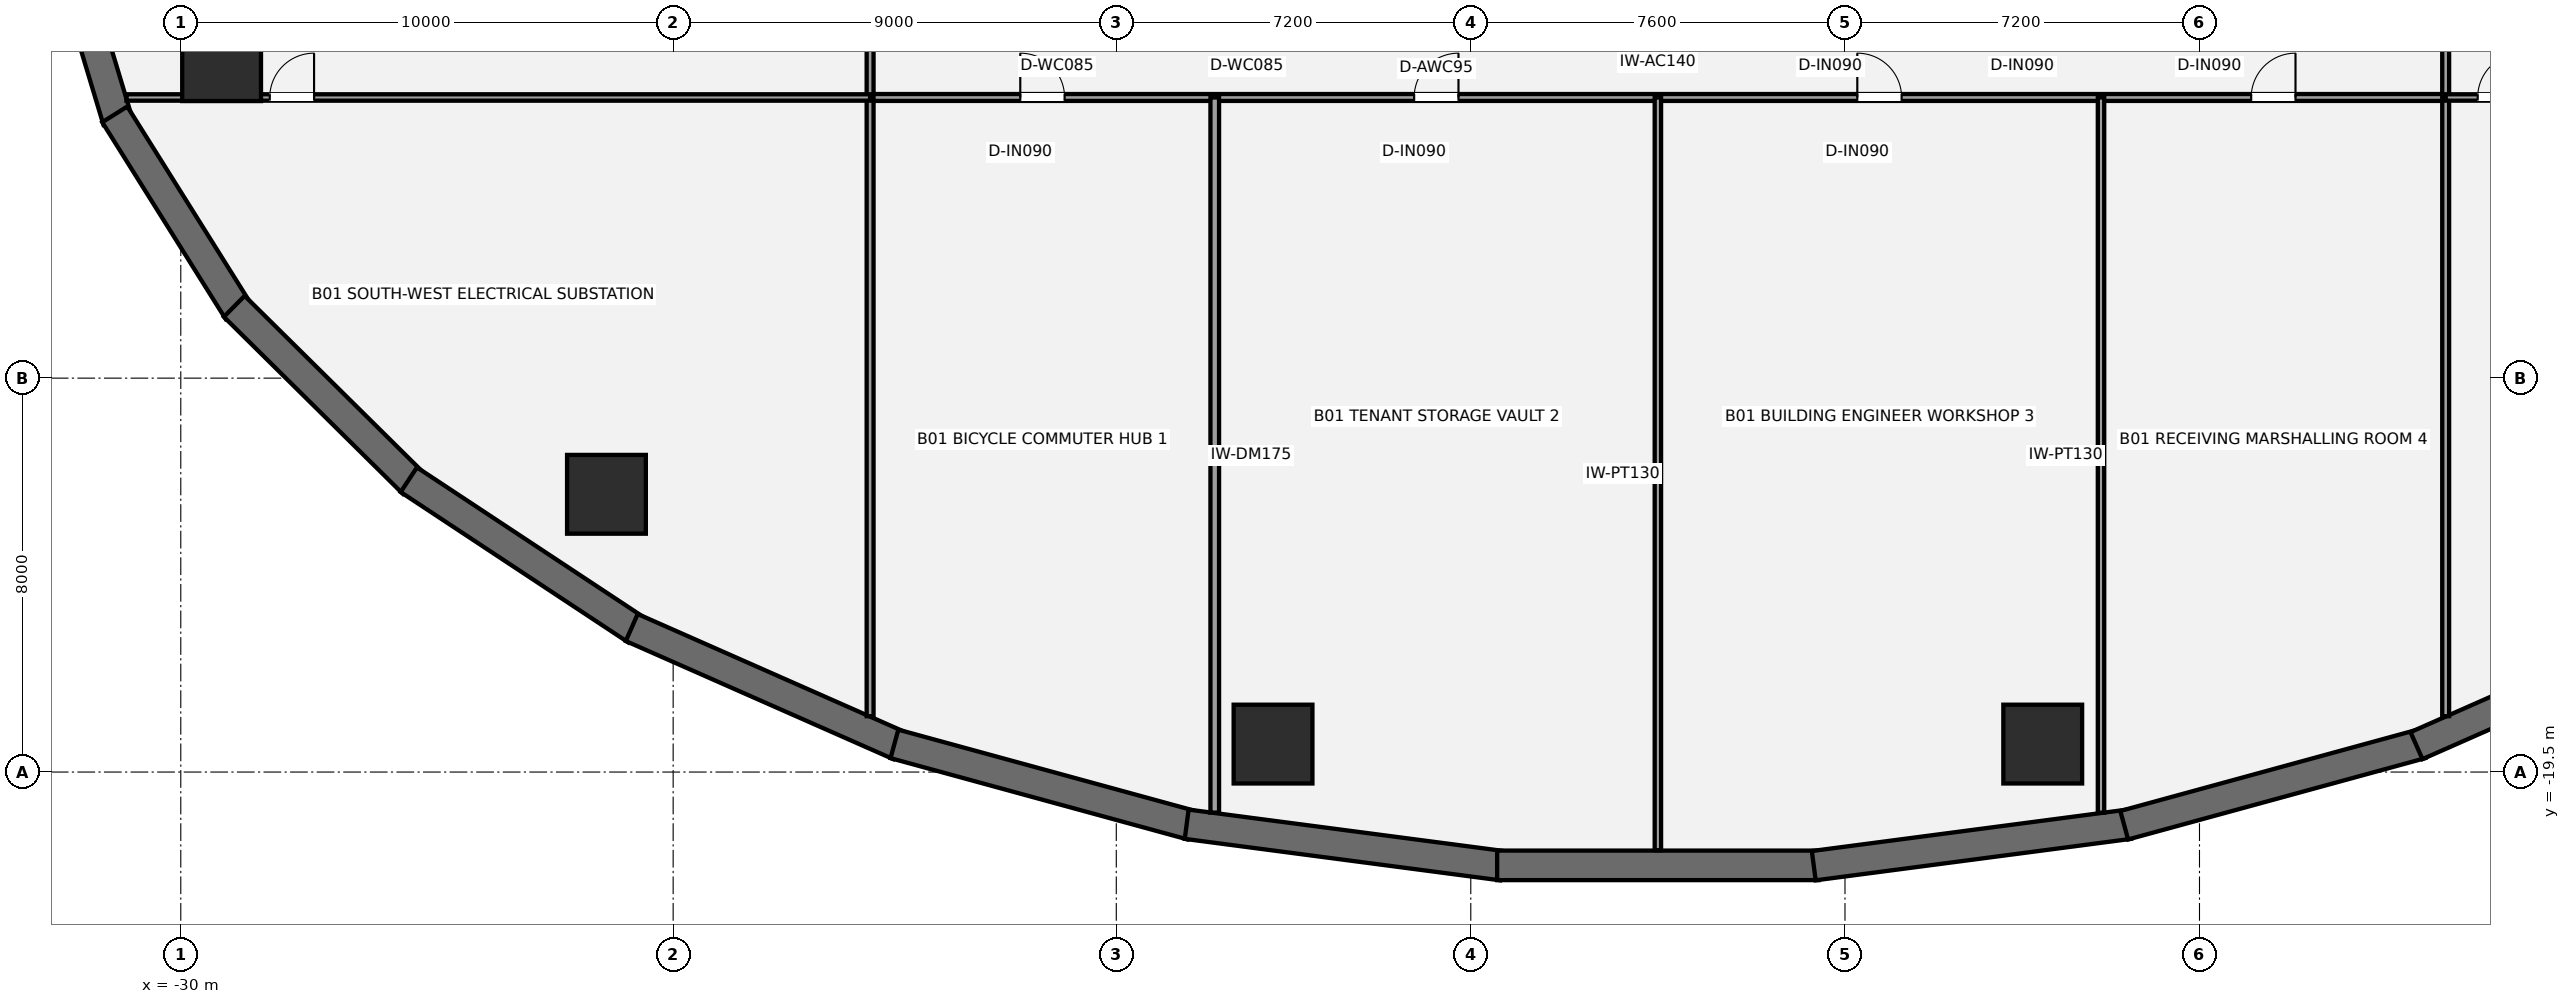
"""IFC4 building model, lengths in metres.
Left out: names, types, materials, properties, quantities, classifications, styles, units other than length and angle.
Written with IfcOpenShell. Run it as: python <this file> out.ifc"""

import sys

from ifc_helpers import new_model, si_unit, direction, frame, frame_2d, origin, origin_2d, place, context, subcontext, project, spatial, rectangle, hollow_circle, extrude, element, fill, save


model = new_model("IFC4")
c1 = context("Model", 3, precision=1e-05, world=origin(), true_north=direction((0.0, 1.0)))
c2 = subcontext(c1, "Body", "Model", "MODEL_VIEW")
j1 = project(units=[si_unit("LENGTHUNIT", "METRE"), si_unit("PLANEANGLEUNIT", "RADIAN")], contexts=[c1])
p1 = place(None, origin())
s1 = spatial("IfcSite", under=j1, at=p1, CompositionType="ELEMENT")
p2 = place(p1, origin())
s2 = spatial("IfcBuilding", under=s1, at=p2, CompositionType="ELEMENT")
p3 = place(p2, frame((0.0, 0.0, -4.4)))
s3 = spatial("IfcBuildingStorey", under=s2, at=p3, CompositionType="ELEMENT", Elevation=-4.4)
p4 = place(p3, frame((-32.562, -2.021, 0.0), z_axis=(0.0, 0.0, 1.0), x_axis=(0.288296686647, -0.95754113252, 0.0)))
e1 = element("IfcWall", 1, at=p4, inside=s3, PredefinedType="USERDEFINED", context=c2, shape_type="SweptSolid", body=[
    extrude(rectangle(XDim=4.438, YDim=0.6, at=frame_2d((2.219, 0.0))), origin(), (0.0, 0.0, 1.0), 4.4),
])
p5 = place(p3, frame((-31.341, -6.143, 0.0), z_axis=(0.0, 0.0, 1.0), x_axis=(0.531244363113, -0.847218641592, 0.0)))
e2 = element("IfcWall", 2, at=p5, inside=s3, PredefinedType="USERDEFINED", context=c2, shape_type="SweptSolid", body=[
    extrude(rectangle(XDim=4.72, YDim=0.6, at=frame_2d((2.36, 0.0))), origin(), (0.0, 0.0, 1.0), 4.4),
])
p6 = place(p3, frame((-28.914, -10.042, 0.0), z_axis=(0.0, 0.0, 1.0), x_axis=(0.711105403666, -0.70308541791, 0.0)))
e3 = element("IfcWall", 3, at=p6, inside=s3, PredefinedType="USERDEFINED", context=c2, shape_type="SweptSolid", body=[
    extrude(rectangle(XDim=5.114, YDim=0.6, at=frame_2d((2.557, 0.0))), origin(), (0.0, 0.0, 1.0), 4.4),
])
p7 = place(p3, frame((-25.369, -13.563, 0.0), z_axis=(0.0, 0.0, 1.0), x_axis=(0.834367518908, -0.551208529861, 0.0)))
e4 = element("IfcWall", 4, at=p7, inside=s3, PredefinedType="USERDEFINED", context=c2, shape_type="SweptSolid", body=[
    extrude(rectangle(XDim=5.542, YDim=0.6, at=frame_2d((2.771, 0.0))), origin(), (0.0, 0.0, 1.0), 4.4),
])
p8 = place(p3, frame((-20.841, -16.565, 0.0), z_axis=(0.0, 0.0, 1.0), x_axis=(0.91483072277, -0.403837527574, 0.0)))
e5 = element("IfcWall", 5, at=p8, inside=s3, PredefinedType="USERDEFINED", context=c2, shape_type="SweptSolid", body=[
    extrude(rectangle(XDim=5.94, YDim=0.6, at=frame_2d((2.97, 0.0))), origin(), (0.0, 0.0, 1.0), 4.4),
])
p9 = place(p3, frame((-15.506, -18.929, 0.0), z_axis=(0.0, 0.0, 1.0), x_axis=(0.964548276597, -0.263906464707, 0.0)))
e6 = element("IfcWall", 6, at=p9, inside=s3, PredefinedType="USERDEFINED", context=c2, shape_type="SweptSolid", body=[
    extrude(rectangle(XDim=6.257, YDim=0.6, at=frame_2d((3.128, 0.0))), origin(), (0.0, 0.0, 1.0), 4.4),
])
p10 = place(p3, frame((-9.57, -20.56, 0.0), z_axis=(0.0, 0.0, 1.0), x_axis=(0.991471782517, -0.130321542624, 0.0)))
e7 = element("IfcWall", 7, at=p10, inside=s3, PredefinedType="USERDEFINED", context=c2, shape_type="SweptSolid", body=[
    extrude(rectangle(XDim=6.459, YDim=0.6, at=frame_2d((3.23, 0.0))), origin(), (0.0, 0.0, 1.0), 4.4),
])
p11 = place(p3, frame((-3.265, -21.395, 0.0), z_axis=(0.0, 0.0, 1.0), x_axis=(1.0, 0.0, 0.0)))
e8 = element("IfcWall", 8, at=p11, inside=s3, PredefinedType="USERDEFINED", context=c2, shape_type="SweptSolid", body=[
    extrude(rectangle(XDim=6.529, YDim=0.6, at=frame_2d((3.265, 0.0))), origin(), (0.0, 0.0, 1.0), 4.4),
])
p12 = place(p3, frame((3.166, -21.402, 0.0), z_axis=(0.0, 0.0, 1.0), x_axis=(0.991471782517, 0.130321542624, 0.0)))
e9 = element("IfcWall", 9, at=p12, inside=s3, PredefinedType="USERDEFINED", context=c2, shape_type="SweptSolid", body=[
    extrude(rectangle(XDim=6.459, YDim=0.6, at=frame_2d((3.23, 0.0))), origin(), (0.0, 0.0, 1.0), 4.4),
])
p13 = place(p3, frame((9.471, -20.58, 0.0), z_axis=(0.0, 0.0, 1.0), x_axis=(0.964548276597, 0.263906464707, 0.0)))
e10 = element("IfcWall", 10, at=p13, inside=s3, PredefinedType="USERDEFINED", context=c2, shape_type="SweptSolid", body=[
    extrude(rectangle(XDim=6.257, YDim=0.6, at=frame_2d((3.128, 0.0))), origin(), (0.0, 0.0, 1.0), 4.4),
])
p14 = place(p3, frame((15.407, -18.964, 0.0), z_axis=(0.0, 0.0, 1.0), x_axis=(0.91483072277, 0.403837527574, 0.0)))
e11 = element("IfcWall", 11, at=p14, inside=s3, PredefinedType="USERDEFINED", context=c2, shape_type="SweptSolid", body=[
    extrude(rectangle(XDim=5.94, YDim=0.6, at=frame_2d((2.97, 0.0))), origin(), (0.0, 0.0, 1.0), 4.4),
])
for number, where, z_axis, x_axis in (
    (12, (-29.171, -5.073, 0.0), (0.0, 0.0, 1.0), (1.0, 0.0, 0.0)),
    (13, (-21.354, -13.859, 0.0), (0.0, 0.0, 1.0), (1.0, 0.0, 0.0)),
    (14, (-7.816, -18.932, 0.0), (0.0, 0.0, 1.0), (1.0, 0.0, 0.0)),
    (15, (7.816, -18.932, 0.0), (0.0, 0.0, 1.0), (1.0, 0.0, 0.0)),
):
    element("IfcColumn", number, at=place(p3, frame(where, z_axis=z_axis, x_axis=x_axis)), inside=s3, PredefinedType="USERDEFINED", context=c2, shape_type="SweptSolid", body=[
        extrude(hollow_circle(Radius=0.8, WallThickness=0.06, at=origin_2d()), origin(), (0.0, 0.0, 1.0), 4.4),
    ])
p15 = place(p3, frame((-16.0, -5.8, 0.0), z_axis=(0.0, 0.0, 1.0), x_axis=(1.0, 0.0, 0.0)))
e16 = element("IfcWall", 16, at=p15, inside=s3, PredefinedType="PARTITIONING", context=c2, shape_type="SweptSolid", body=[
    extrude(rectangle(XDim=32.0, YDim=0.14, at=frame_2d((16.0, 0.0))), origin(), (0.0, 0.0, 1.0), 4.14),
])
p16 = place(p15, frame((3.05, 0.0, 0.0)))
e17 = element("IfcOpeningElement", 17, at=p16, cuts=e16, PredefinedType="OPENING", context=c2, shape_type="SweptSolid", body=[
    extrude(rectangle(XDim=0.9, YDim=2.1, at=frame_2d((0.45, 1.05))), frame((0.0, 0.08, 0.0), z_axis=(0.0, -1.0, 0.0), x_axis=(1.0, 0.0, 0.0)), (0.0, 0.0, 1.0), 0.16),
])
p17 = place(p15, frame((11.05, 0.0, 0.0)))
e18 = element("IfcOpeningElement", 18, at=p17, cuts=e16, PredefinedType="OPENING", context=c2, shape_type="SweptSolid", body=[
    extrude(rectangle(XDim=0.9, YDim=2.1, at=frame_2d((0.45, 1.05))), frame((0.0, 0.08, 0.0), z_axis=(0.0, -1.0, 0.0), x_axis=(1.0, 0.0, 0.0)), (0.0, 0.0, 1.0), 0.16),
])
p18 = place(p15, frame((20.05, 0.0, 0.0)))
e19 = element("IfcOpeningElement", 19, at=p18, cuts=e16, PredefinedType="OPENING", context=c2, shape_type="SweptSolid", body=[
    extrude(rectangle(XDim=0.9, YDim=2.1, at=frame_2d((0.45, 1.05))), frame((0.0, 0.08, 0.0), z_axis=(0.0, -1.0, 0.0), x_axis=(1.0, 0.0, 0.0)), (0.0, 0.0, 1.0), 0.16),
])
p19 = place(p15, frame((28.05, 0.0, 0.0)))
e20 = element("IfcOpeningElement", 20, at=p19, cuts=e16, PredefinedType="OPENING", context=c2, shape_type="SweptSolid", body=[
    extrude(rectangle(XDim=0.9, YDim=2.1, at=frame_2d((0.45, 1.05))), frame((0.0, 0.08, 0.0), z_axis=(0.0, -1.0, 0.0), x_axis=(1.0, 0.0, 0.0)), (0.0, 0.0, 1.0), 0.16),
])
p20 = place(p3, frame((-16.0, -18.365, 0.0), z_axis=(0.0, 0.0, 1.0), x_axis=(0.0, 1.0, 0.0)))
e21 = element("IfcWall", 21, at=p20, inside=s3, PredefinedType="PARTITIONING", context=c2, shape_type="SweptSolid", body=[
    extrude(rectangle(XDim=25.916, YDim=0.14, at=frame_2d((12.958, 0.0))), origin(), (0.0, 0.0, 1.0), 3.508),
])
p21 = place(p20, frame((15.766, 0.0, 0.0)))
e22 = element("IfcOpeningElement", 22, at=p21, cuts=e21, PredefinedType="OPENING", context=c2, shape_type="SweptSolid", body=[
    extrude(rectangle(XDim=0.9, YDim=2.1, at=frame_2d((0.45, 1.05))), frame((0.0, 0.08, 0.0), z_axis=(0.0, -1.0, 0.0), x_axis=(1.0, 0.0, 0.0)), (0.0, 0.0, 1.0), 0.16),
])
p22 = place(p20, frame((22.441, 0.0, 0.0)))
e23 = element("IfcOpeningElement", 23, at=p22, cuts=e21, PredefinedType="OPENING", context=c2, shape_type="SweptSolid", body=[
    extrude(rectangle(XDim=0.9, YDim=2.1, at=frame_2d((0.45, 1.05))), frame((0.0, 0.08, 0.0), z_axis=(0.0, -1.0, 0.0), x_axis=(1.0, 0.0, 0.0)), (0.0, 0.0, 1.0), 0.16),
])
p23 = place(p3, frame((16.0, -18.365, 0.0), z_axis=(0.0, 0.0, 1.0), x_axis=(0.0, 1.0, 0.0)))
e24 = element("IfcWall", 24, at=p23, inside=s3, PredefinedType="PARTITIONING", context=c2, shape_type="SweptSolid", body=[
    extrude(rectangle(XDim=25.916, YDim=0.14, at=frame_2d((12.958, 0.0))), origin(), (0.0, 0.0, 1.0), 3.508),
])
p24 = place(p23, frame((15.766, 0.0, 0.0)))
e25 = element("IfcOpeningElement", 25, at=p24, cuts=e24, PredefinedType="OPENING", context=c2, shape_type="SweptSolid", body=[
    extrude(rectangle(XDim=0.9, YDim=2.1, at=frame_2d((0.45, 1.05))), frame((0.0, 0.08, 0.0), z_axis=(0.0, -1.0, 0.0), x_axis=(1.0, 0.0, 0.0)), (0.0, 0.0, 1.0), 0.16),
])
p25 = place(p23, frame((22.441, 0.0, 0.0)))
e26 = element("IfcOpeningElement", 26, at=p25, cuts=e24, PredefinedType="OPENING", context=c2, shape_type="SweptSolid", body=[
    extrude(rectangle(XDim=0.9, YDim=2.1, at=frame_2d((0.45, 1.05))), frame((0.0, 0.08, 0.0), z_axis=(0.0, -1.0, 0.0), x_axis=(1.0, 0.0, 0.0)), (0.0, 0.0, 1.0), 0.16),
])
p26 = place(p3, frame((-9.0, -20.324, 0.0), z_axis=(0.0, 0.0, 1.0), x_axis=(0.0, 1.0, 0.0)))
e27 = element("IfcWall", 27, at=p26, inside=s3, PredefinedType="PARTITIONING", context=c2, shape_type="SweptSolid", body=[
    extrude(rectangle(XDim=14.524, YDim=0.175, at=frame_2d((7.262, 0.0))), origin(), (0.0, 0.0, 1.0), 4.14),
])
p27 = place(p3, frame((0.0, -21.087, 0.0), z_axis=(0.0, 0.0, 1.0), x_axis=(0.0, 1.0, 0.0)))
e28 = element("IfcWall", 28, at=p27, inside=s3, PredefinedType="PARTITIONING", context=c2, shape_type="SweptSolid", body=[
    extrude(rectangle(XDim=15.287, YDim=0.13, at=frame_2d((7.644, 0.0))), origin(), (0.0, 0.0, 1.0), 4.14),
])
p28 = place(p3, frame((9.0, -20.324, 0.0), z_axis=(0.0, 0.0, 1.0), x_axis=(0.0, 1.0, 0.0)))
e29 = element("IfcWall", 29, at=p28, inside=s3, PredefinedType="PARTITIONING", context=c2, shape_type="SweptSolid", body=[
    extrude(rectangle(XDim=14.524, YDim=0.13, at=frame_2d((7.262, 0.0))), origin(), (0.0, 0.0, 1.0), 4.14),
])
p29 = place(p3, frame((-31.103, -5.8, 0.0), z_axis=(0.0, 0.0, 1.0), x_axis=(1.0, 0.0, 0.0)))
e30 = element("IfcWall", 30, at=p29, inside=s3, PredefinedType="PARTITIONING", context=c2, shape_type="SweptSolid", body=[
    extrude(rectangle(XDim=15.103, YDim=0.13, at=frame_2d((7.552, 0.0))), origin(), (0.0, 0.0, 1.0), 3.118),
])
p30 = place(p29, frame((2.91, 0.0, 0.0)))
e31 = element("IfcOpeningElement", 31, at=p30, cuts=e30, PredefinedType="OPENING", context=c2, shape_type="SweptSolid", body=[
    extrude(rectangle(XDim=0.9, YDim=2.1, at=frame_2d((0.45, 1.05))), frame((0.0, 0.075, 0.0), z_axis=(0.0, -1.0, 0.0), x_axis=(1.0, 0.0, 0.0)), (0.0, 0.0, 1.0), 0.15),
])
p31 = place(p3, frame((16.0, -5.8, 0.0), z_axis=(0.0, 0.0, 1.0), x_axis=(1.0, 0.0, 0.0)))
e32 = element("IfcWall", 32, at=p31, inside=s3, PredefinedType="PARTITIONING", context=c2, shape_type="SweptSolid", body=[
    extrude(rectangle(XDim=15.103, YDim=0.13, at=frame_2d((7.552, 0.0))), origin(), (0.0, 0.0, 1.0), 3.118),
])
p32 = place(p31, frame((0.65, 0.0, 0.0)))
e33 = element("IfcOpeningElement", 33, at=p32, cuts=e32, PredefinedType="OPENING", context=c2, shape_type="SweptSolid", body=[
    extrude(rectangle(XDim=0.9, YDim=2.1, at=frame_2d((0.45, 1.05))), frame((0.0, 0.075, 0.0), z_axis=(0.0, -1.0, 0.0), x_axis=(1.0, 0.0, 0.0)), (0.0, 0.0, 1.0), 0.15),
])
p33 = place(p16, origin())
e34 = element("IfcDoor", 34, at=p33, inside=s3, OperationType="SINGLE_SWING_LEFT", PredefinedType="DOOR", context=c2, shape_type="SweptSolid", body=[
    extrude(rectangle(XDim=0.9, YDim=2.1, at=frame_2d((0.45, 1.05))), frame((0.0, 0.025, 0.0), z_axis=(0.0, -1.0, 0.0), x_axis=(1.0, 0.0, 0.0)), (0.0, 0.0, 1.0), 0.05),
])
fill(e17, e34)
p34 = place(p17, origin())
e35 = element("IfcDoor", 35, at=p34, inside=s3, OperationType="SINGLE_SWING_RIGHT", PredefinedType="DOOR", context=c2, shape_type="SweptSolid", body=[
    extrude(rectangle(XDim=0.9, YDim=2.1, at=frame_2d((0.45, 1.05))), frame((0.0, 0.025, 0.0), z_axis=(0.0, -1.0, 0.0), x_axis=(1.0, 0.0, 0.0)), (0.0, 0.0, 1.0), 0.05),
])
fill(e18, e35)
p35 = place(p18, origin())
e36 = element("IfcDoor", 36, at=p35, inside=s3, OperationType="SINGLE_SWING_LEFT", PredefinedType="DOOR", context=c2, shape_type="SweptSolid", body=[
    extrude(rectangle(XDim=0.9, YDim=2.1, at=frame_2d((0.45, 1.05))), frame((0.0, 0.025, 0.0), z_axis=(0.0, -1.0, 0.0), x_axis=(1.0, 0.0, 0.0)), (0.0, 0.0, 1.0), 0.05),
])
fill(e19, e36)
p36 = place(p19, origin())
e37 = element("IfcDoor", 37, at=p36, inside=s3, OperationType="SINGLE_SWING_RIGHT", PredefinedType="DOOR", context=c2, shape_type="SweptSolid", body=[
    extrude(rectangle(XDim=0.9, YDim=2.1, at=frame_2d((0.45, 1.05))), frame((0.0, 0.025, 0.0), z_axis=(0.0, -1.0, 0.0), x_axis=(1.0, 0.0, 0.0)), (0.0, 0.0, 1.0), 0.05),
])
fill(e20, e37)
p37 = place(p30, origin())
e38 = element("IfcDoor", 38, at=p37, inside=s3, OperationType="SINGLE_SWING_RIGHT", PredefinedType="DOOR", context=c2, shape_type="SweptSolid", body=[
    extrude(rectangle(XDim=0.9, YDim=2.1, at=frame_2d((0.45, 1.05))), frame((0.0, 0.025, 0.0), z_axis=(0.0, -1.0, 0.0), x_axis=(1.0, 0.0, 0.0)), (0.0, 0.0, 1.0), 0.05),
])
fill(e31, e38)
p38 = place(p32, origin())
e39 = element("IfcDoor", 39, at=p38, inside=s3, OperationType="SINGLE_SWING_RIGHT", PredefinedType="DOOR", context=c2, shape_type="SweptSolid", body=[
    extrude(rectangle(XDim=0.9, YDim=2.1, at=frame_2d((0.45, 1.05))), frame((0.0, 0.025, 0.0), z_axis=(0.0, -1.0, 0.0), x_axis=(1.0, 0.0, 0.0)), (0.0, 0.0, 1.0), 0.05),
])
fill(e33, e39)
save(model, sys.argv[1])
